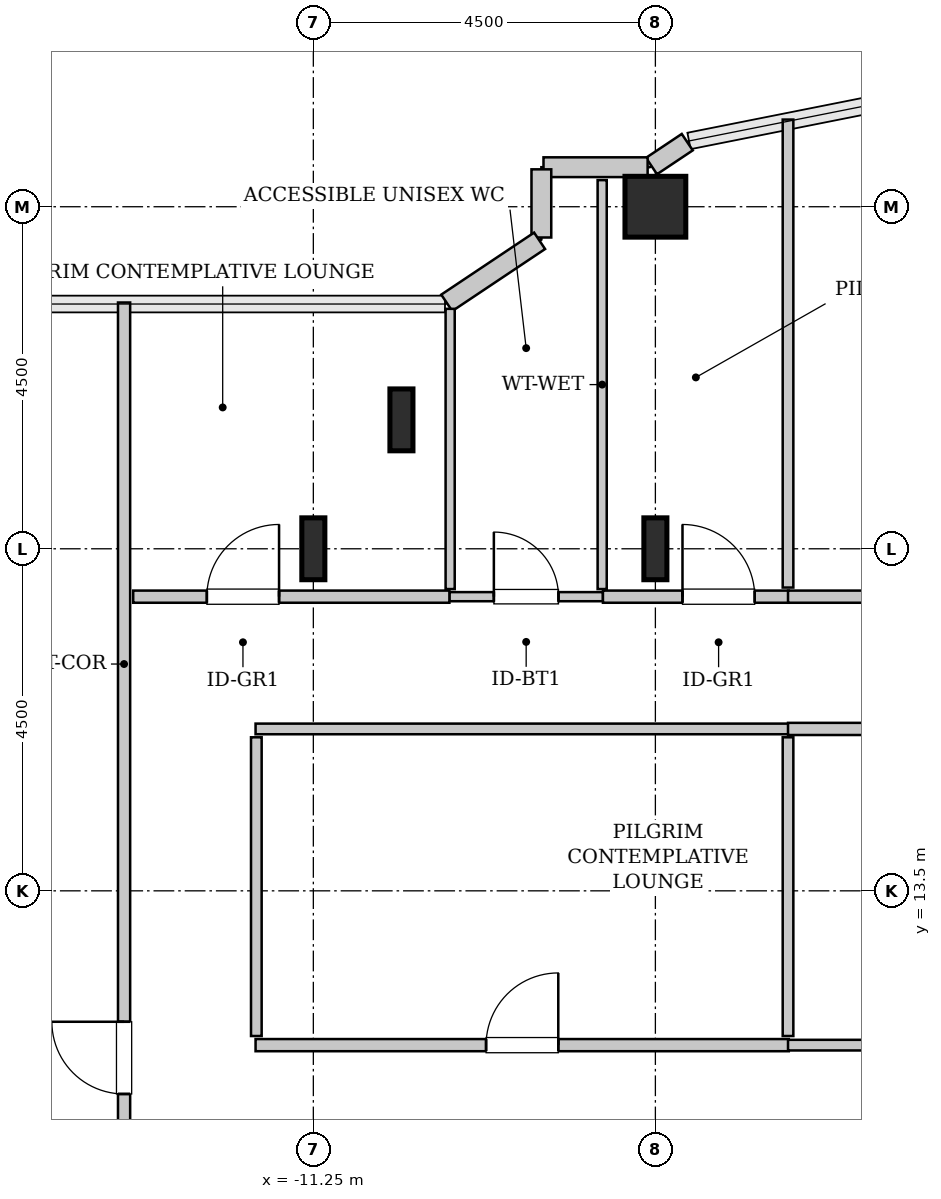
"""IFC4 building model, lengths in metres.
Left out: names, types, materials, properties, quantities, classifications, styles, units other than length and angle.
Written with IfcOpenShell. Run it as: python <this file> out.ifc"""

import sys

from ifc_helpers import new_model, si_unit, direction, frame, frame_2d, origin, origin_2d, place, context, subcontext, project, spatial, rectangle, hollow_rectangle, i_section, extrude, source, transform, mapped, element, fill, save


model = new_model("IFC4")
c1 = context("Model", 3, precision=1e-05, world=origin(), true_north=direction((0.0, 1.0)))
c2 = subcontext(c1, "Body", "Model", "MODEL_VIEW")
j1 = project(units=[si_unit("LENGTHUNIT", "METRE"), si_unit("PLANEANGLEUNIT", "RADIAN")], contexts=[c1])
p1 = place(None, origin())
s1 = spatial("IfcSite", under=j1, at=p1, CompositionType="ELEMENT")
p2 = place(p1, origin())
s2 = spatial("IfcBuilding", under=s1, at=p2, CompositionType="ELEMENT")
p3 = place(p2, frame((0.0, 0.0, 152.6)))
s3 = spatial("IfcBuildingStorey", under=s2, at=p3, CompositionType="ELEMENT", Elevation=152.6)
m1 = source(origin(), c2, "Body", "SweptSolid", [
    extrude(i_section(OverallWidth=0.303, OverallDepth=0.814, WebThickness=0.021, FlangeThickness=0.04, FilletRadius=0.03, at=origin_2d()), origin(), (0.0, 0.0, 1.0), 3.8),
])
for number, where, z_axis, x_axis in (
    (1, (-11.25, 18.0, 0.0), (0.0, 0.0, 1.0), (1.0, 0.0, 0.0)),
    (2, (-10.091, 19.696, 0.0), (0.0, 0.0, 1.0), (1.0, 0.0, 0.0)),
    (3, (-6.75, 18.0, 0.0), (0.0, 0.0, 1.0), (1.0, 0.0, 0.0)),
):
    element("IfcColumn", number, at=place(p3, frame(where, z_axis=z_axis, x_axis=x_axis)), inside=s3, PredefinedType="COLUMN", context=c2, shape_type="MappedRepresentation", body=[
        mapped(m1, transform((0.0, 0.0, 0.0), x_axis=(1.0, 0.0, 0.0), y_axis=(0.0, 1.0, 0.0), z_axis=(0.0, 0.0, 1.0), scale=1.0)),
    ])
m2 = source(origin(), c2, "Body", "SweptSolid", [
    extrude(hollow_rectangle(XDim=0.8, YDim=0.8, WallThickness=0.04, InnerFilletRadius=0.04, OuterFilletRadius=0.08, at=origin_2d()), origin(), (0.0, 0.0, 1.0), 3.8),
])
p4 = place(p3, frame((-6.75, 22.5, 0.0), z_axis=(0.0, 0.0, 1.0), x_axis=(1.0, 0.0, 0.0)))
e4 = element("IfcColumn", 4, at=p4, inside=s3, PredefinedType="COLUMN", context=c2, shape_type="MappedRepresentation", body=[
    mapped(m2, transform((0.0, 0.0, 0.0), x_axis=(1.0, 0.0, 0.0), y_axis=(0.0, 1.0, 0.0), z_axis=(0.0, 0.0, 1.0), scale=1.0)),
])
m3 = source(origin(), c2, "Body", "SweptSolid", [
    extrude(rectangle(XDim=0.565, YDim=0.26, at=frame_2d((0.283, 0.0))), origin(), (0.0, 0.0, 1.0), 3.55),
])
p5 = place(p3, frame((-6.331, 23.35, 0.0), z_axis=(0.0, 0.0, 1.0), x_axis=(-0.831651492666, -0.555297933317, 0.0)))
e5 = element("IfcWall", 5, at=p5, inside=s3, PredefinedType="SOLIDWALL", context=c2, shape_type="MappedRepresentation", body=[
    mapped(m3, transform((0.0, 0.0, 0.0), x_axis=(1.0, 0.0, 0.0), y_axis=(0.0, 1.0, 0.0), z_axis=(0.0, 0.0, 1.0), scale=1.0)),
])
m4 = source(origin(), c2, "Body", "SweptSolid", [
    extrude(rectangle(XDim=1.37, YDim=0.26, at=frame_2d((0.685, 0.0))), origin(), (0.0, 0.0, 1.0), 3.55),
])
p6 = place(p3, frame((-6.852, 23.02, 0.0), z_axis=(0.0, 0.0, 1.0), x_axis=(-1.0, 0.0, 0.0)))
e6 = element("IfcWall", 6, at=p6, inside=s3, PredefinedType="SOLIDWALL", context=c2, shape_type="MappedRepresentation", body=[
    mapped(m4, transform((0.0, 0.0, 0.0), x_axis=(1.0, 0.0, 0.0), y_axis=(0.0, 1.0, 0.0), z_axis=(0.0, 0.0, 1.0), scale=1.0)),
])
m5 = source(origin(), c2, "Body", "SweptSolid", [
    extrude(rectangle(XDim=0.897, YDim=0.26, at=frame_2d((0.448, 0.0))), origin(), (0.0, 0.0, 1.0), 3.55),
])
p7 = place(p3, frame((-8.25, 22.992, 0.0), z_axis=(0.0, 0.0, 1.0), x_axis=(0.0, -1.0, 0.0)))
e7 = element("IfcWall", 7, at=p7, inside=s3, PredefinedType="SOLIDWALL", context=c2, shape_type="MappedRepresentation", body=[
    mapped(m5, transform((0.0, 0.0, 0.0), x_axis=(1.0, 0.0, 0.0), y_axis=(0.0, 1.0, 0.0), z_axis=(0.0, 0.0, 1.0), scale=1.0)),
])
m6 = source(origin(), c2, "Body", "SweptSolid", [
    extrude(rectangle(XDim=1.469, YDim=0.26, at=frame_2d((0.734, 0.0))), origin(), (0.0, 0.0, 1.0), 3.55),
])
p8 = place(p3, frame((-8.273, 22.052, 0.0), z_axis=(0.0, 0.0, 1.0), x_axis=(-0.831461760506, -0.555581983884, 0.0)))
e8 = element("IfcWall", 8, at=p8, inside=s3, PredefinedType="SOLIDWALL", context=c2, shape_type="MappedRepresentation", body=[
    mapped(m6, transform((0.0, 0.0, 0.0), x_axis=(1.0, 0.0, 0.0), y_axis=(0.0, 1.0, 0.0), z_axis=(0.0, 0.0, 1.0), scale=1.0)),
])
m7 = source(origin(), c2, "Body", "SweptSolid", [
    extrude(rectangle(XDim=2.02, YDim=0.12, at=frame_2d((1.01, 0.0))), origin(), (0.0, 0.0, 1.0), 3.535),
])
p9 = place(p3, frame((-9.46, 17.37, 0.0), z_axis=(0.0, 0.0, 1.0), x_axis=(1.0, 0.0, 0.0)))
e9 = element("IfcWall", 9, at=p9, inside=s3, PredefinedType="PLUMBINGWALL", context=c2, shape_type="MappedRepresentation", body=[
    mapped(m7, transform((0.0, 0.0, 0.0), x_axis=(1.0, 0.0, 0.0), y_axis=(0.0, 1.0, 0.0), z_axis=(0.0, 0.0, 1.0), scale=1.0)),
])
p10 = place(p9, frame((0.585, 0.0, 0.0)))
e10 = element("IfcOpeningElement", 10, at=p10, cuts=e9, PredefinedType="OPENING", context=c2, shape_type="SweptSolid", body=[
    extrude(rectangle(XDim=0.85, YDim=2.1, at=frame_2d((0.425, 1.05))), frame((0.0, 0.07, 0.0), z_axis=(0.0, -1.0, 0.0), x_axis=(1.0, 0.0, 0.0)), (0.0, 0.0, 1.0), 0.14),
])
m8 = source(origin(), c2, "Body", "SweptSolid", [
    extrude(rectangle(XDim=5.38, YDim=0.12, at=frame_2d((2.69, 0.0))), origin(), (0.0, 0.0, 1.0), 3.535),
])
p11 = place(p3, frame((-7.45, 17.47, 0.0), z_axis=(0.0, 0.0, 1.0), x_axis=(0.0, 1.0, 0.0)))
e11 = element("IfcWall", 11, at=p11, inside=s3, PredefinedType="PLUMBINGWALL", context=c2, shape_type="MappedRepresentation", body=[
    mapped(m8, transform((0.0, 0.0, 0.0), x_axis=(1.0, 0.0, 0.0), y_axis=(0.0, 1.0, 0.0), z_axis=(0.0, 0.0, 1.0), scale=1.0)),
])
m9 = source(origin(), c2, "Body", "SweptSolid", [
    extrude(rectangle(XDim=3.687, YDim=0.12, at=frame_2d((1.843, 0.0))), origin(), (0.0, 0.0, 1.0), 3.535),
])
p12 = place(p3, frame((-9.45, 17.47, 0.0), z_axis=(0.0, 0.0, 1.0), x_axis=(0.0, 1.0, 0.0)))
e12 = element("IfcWall", 12, at=p12, inside=s3, PredefinedType="PLUMBINGWALL", context=c2, shape_type="MappedRepresentation", body=[
    mapped(m9, transform((0.0, 0.0, 0.0), x_axis=(1.0, 0.0, 0.0), y_axis=(0.0, 1.0, 0.0), z_axis=(0.0, 0.0, 1.0), scale=1.0)),
])
m10 = source(origin(), c2, "Body", "SweptSolid", [
    extrude(rectangle(XDim=16.045, YDim=0.16, at=frame_2d((8.022, 0.0))), origin(), (0.0, 0.0, 1.0), 3.535),
])
p13 = place(p3, frame((-13.74, 5.195, 0.0), z_axis=(0.0, 0.0, 1.0), x_axis=(0.0, 1.0, 0.0)))
e13 = element("IfcWall", 13, at=p13, inside=s3, PredefinedType="PARTITIONING", context=c2, shape_type="MappedRepresentation", body=[
    mapped(m10, transform((0.0, 0.0, 0.0), x_axis=(1.0, 0.0, 0.0), y_axis=(0.0, 1.0, 0.0), z_axis=(0.0, 0.0, 1.0), scale=1.0)),
])
p14 = place(p13, frame((5.633, 0.0, 0.0)))
e14 = element("IfcOpeningElement", 14, at=p14, cuts=e13, PredefinedType="OPENING", context=c2, shape_type="SweptSolid", body=[
    extrude(rectangle(XDim=0.95, YDim=2.1, at=frame_2d((0.475, 1.05))), frame((0.0, 0.09, 0.0), z_axis=(0.0, -1.0, 0.0), x_axis=(1.0, 0.0, 0.0)), (0.0, 0.0, 1.0), 0.18),
])
m11 = source(origin(), c2, "Body", "SweptSolid", [
    extrude(rectangle(XDim=7.015, YDim=0.16, at=frame_2d((3.507, 0.0))), origin(), (0.0, 0.0, 1.0), 3.535),
])
p15 = place(p3, frame((-12.01, 11.47, 0.0), z_axis=(0.0, 0.0, 1.0), x_axis=(1.0, 0.0, 0.0)))
e15 = element("IfcWall", 15, at=p15, inside=s3, PredefinedType="PARTITIONING", context=c2, shape_type="MappedRepresentation", body=[
    mapped(m11, transform((0.0, 0.0, 0.0), x_axis=(1.0, 0.0, 0.0), y_axis=(0.0, 1.0, 0.0), z_axis=(0.0, 0.0, 1.0), scale=1.0)),
])
p16 = place(p15, frame((3.032, 0.0, 0.0)))
e16 = element("IfcOpeningElement", 16, at=p16, cuts=e15, PredefinedType="OPENING", context=c2, shape_type="SweptSolid", body=[
    extrude(rectangle(XDim=0.95, YDim=2.1, at=frame_2d((0.475, 1.05))), frame((0.0, 0.09, 0.0), z_axis=(0.0, -1.0, 0.0), x_axis=(1.0, 0.0, 0.0)), (0.0, 0.0, 1.0), 0.18),
])
m12 = source(origin(), c2, "Body", "SweptSolid", [
    extrude(rectangle(XDim=7.015, YDim=0.14, at=frame_2d((3.507, 0.0))), origin(), (0.0, 0.0, 1.0), 3.535),
])
p17 = place(p3, frame((-12.01, 15.63, 0.0), z_axis=(0.0, 0.0, 1.0), x_axis=(1.0, 0.0, 0.0)))
e17 = element("IfcWall", 17, at=p17, inside=s3, PredefinedType="PARTITIONING", context=c2, shape_type="MappedRepresentation", body=[
    mapped(m12, transform((0.0, 0.0, 0.0), x_axis=(1.0, 0.0, 0.0), y_axis=(0.0, 1.0, 0.0), z_axis=(0.0, 0.0, 1.0), scale=1.0)),
])
m13 = source(origin(), c2, "Body", "SweptSolid", [
    extrude(rectangle(XDim=3.93, YDim=0.14, at=frame_2d((1.965, 0.0))), origin(), (0.0, 0.0, 1.0), 3.535),
])
for number, where, z_axis, x_axis in (
    (18, (-12.0, 11.59, 0.0), (0.0, 0.0, 1.0), (0.0, 1.0, 0.0)),
    (19, (-5.005, 11.59, 0.0), (0.0, 0.0, 1.0), (0.0, 1.0, 0.0)),
):
    element("IfcWall", number, at=place(p3, frame(where, z_axis=z_axis, x_axis=x_axis)), inside=s3, PredefinedType="PARTITIONING", context=c2, shape_type="MappedRepresentation", body=[
        mapped(m13, transform((0.0, 0.0, 0.0), x_axis=(1.0, 0.0, 0.0), y_axis=(0.0, 1.0, 0.0), z_axis=(0.0, 0.0, 1.0), scale=1.0)),
    ])
m14 = source(origin(), c2, "Body", "SweptSolid", [
    extrude(rectangle(XDim=2.445, YDim=0.16, at=frame_2d((1.222, 0.0))), origin(), (0.0, 0.0, 1.0), 3.535),
])
p18 = place(p3, frame((-7.44, 17.37, 0.0), z_axis=(0.0, 0.0, 1.0), x_axis=(1.0, 0.0, 0.0)))
e20 = element("IfcWall", 20, at=p18, inside=s3, PredefinedType="PARTITIONING", context=c2, shape_type="MappedRepresentation", body=[
    mapped(m14, transform((0.0, 0.0, 0.0), x_axis=(1.0, 0.0, 0.0), y_axis=(0.0, 1.0, 0.0), z_axis=(0.0, 0.0, 1.0), scale=1.0)),
])
p19 = place(p18, frame((1.047, 0.0, 0.0)))
e21 = element("IfcOpeningElement", 21, at=p19, cuts=e20, PredefinedType="OPENING", context=c2, shape_type="SweptSolid", body=[
    extrude(rectangle(XDim=0.95, YDim=2.1, at=frame_2d((0.475, 1.05))), frame((0.0, 0.09, 0.0), z_axis=(0.0, -1.0, 0.0), x_axis=(1.0, 0.0, 0.0)), (0.0, 0.0, 1.0), 0.18),
])
m15 = source(origin(), c2, "Body", "SweptSolid", [
    extrude(rectangle(XDim=6.157, YDim=0.14, at=frame_2d((3.078, 0.0))), origin(), (0.0, 0.0, 1.0), 3.535),
])
p20 = place(p3, frame((-5.005, 17.49, 0.0), z_axis=(0.0, 0.0, 1.0), x_axis=(0.0, 1.0, 0.0)))
e22 = element("IfcWall", 22, at=p20, inside=s3, PredefinedType="PARTITIONING", context=c2, shape_type="MappedRepresentation", body=[
    mapped(m15, transform((0.0, 0.0, 0.0), x_axis=(1.0, 0.0, 0.0), y_axis=(0.0, 1.0, 0.0), z_axis=(0.0, 0.0, 1.0), scale=1.0)),
])
m16 = source(origin(), c2, "Body", "SweptSolid", [
    extrude(rectangle(XDim=4.16, YDim=0.16, at=frame_2d((2.08, 0.0))), origin(), (0.0, 0.0, 1.0), 3.535),
])
p21 = place(p3, frame((-13.62, 17.37, 0.0), z_axis=(0.0, 0.0, 1.0), x_axis=(1.0, 0.0, 0.0)))
e23 = element("IfcWall", 23, at=p21, inside=s3, PredefinedType="PARTITIONING", context=c2, shape_type="MappedRepresentation", body=[
    mapped(m16, transform((0.0, 0.0, 0.0), x_axis=(1.0, 0.0, 0.0), y_axis=(0.0, 1.0, 0.0), z_axis=(0.0, 0.0, 1.0), scale=1.0)),
])
p22 = place(p21, frame((0.969, 0.0, 0.0)))
e24 = element("IfcOpeningElement", 24, at=p22, cuts=e23, PredefinedType="OPENING", context=c2, shape_type="SweptSolid", body=[
    extrude(rectangle(XDim=0.95, YDim=2.1, at=frame_2d((0.475, 1.05))), frame((0.0, 0.09, 0.0), z_axis=(0.0, -1.0, 0.0), x_axis=(1.0, 0.0, 0.0)), (0.0, 0.0, 1.0), 0.18),
])
m17 = source(origin(), c2, "Body", "SweptSolid", [
    extrude(rectangle(XDim=7.41, YDim=0.16, at=frame_2d((3.705, 0.0))), origin(), (0.0, 0.0, 1.0), 3.535),
])
p23 = place(p3, frame((-5.005, 17.37, 0.0), z_axis=(0.0, 0.0, 1.0), x_axis=(1.0, 0.0, 0.0)))
e25 = element("IfcWall", 25, at=p23, inside=s3, PredefinedType="PARTITIONING", context=c2, shape_type="MappedRepresentation", body=[
    mapped(m17, transform((0.0, 0.0, 0.0), x_axis=(1.0, 0.0, 0.0), y_axis=(0.0, 1.0, 0.0), z_axis=(0.0, 0.0, 1.0), scale=1.0)),
])
p24 = place(p23, frame((3.23, 0.0, 0.0)))
e26 = element("IfcOpeningElement", 26, at=p24, cuts=e25, PredefinedType="OPENING", context=c2, shape_type="SweptSolid", body=[
    extrude(rectangle(XDim=0.95, YDim=2.1, at=frame_2d((0.475, 1.05))), frame((0.0, 0.09, 0.0), z_axis=(0.0, -1.0, 0.0), x_axis=(1.0, 0.0, 0.0)), (0.0, 0.0, 1.0), 0.18),
])
p25 = place(p3, frame((-5.005, 15.63, 0.0), z_axis=(0.0, 0.0, 1.0), x_axis=(1.0, 0.0, 0.0)))
e27 = element("IfcWall", 27, at=p25, inside=s3, PredefinedType="PARTITIONING", context=c2, shape_type="MappedRepresentation", body=[
    mapped(m17, transform((0.0, 0.0, 0.0), x_axis=(1.0, 0.0, 0.0), y_axis=(0.0, 1.0, 0.0), z_axis=(0.0, 0.0, 1.0), scale=1.0)),
])
p26 = place(p25, frame((3.23, 0.0, 0.0)))
e28 = element("IfcOpeningElement", 28, at=p26, cuts=e27, PredefinedType="OPENING", context=c2, shape_type="SweptSolid", body=[
    extrude(rectangle(XDim=0.95, YDim=2.1, at=frame_2d((0.475, 1.05))), frame((0.0, 0.09, 0.0), z_axis=(0.0, -1.0, 0.0), x_axis=(1.0, 0.0, 0.0)), (0.0, 0.0, 1.0), 0.18),
])
m18 = source(origin(), c2, "Body", "SweptSolid", [
    extrude(rectangle(XDim=7.41, YDim=0.14, at=frame_2d((3.705, 0.0))), origin(), (0.0, 0.0, 1.0), 3.535),
])
p27 = place(p3, frame((-5.005, 11.47, 0.0), z_axis=(0.0, 0.0, 1.0), x_axis=(1.0, 0.0, 0.0)))
e29 = element("IfcWall", 29, at=p27, inside=s3, PredefinedType="PARTITIONING", context=c2, shape_type="MappedRepresentation", body=[
    mapped(m18, transform((0.0, 0.0, 0.0), x_axis=(1.0, 0.0, 0.0), y_axis=(0.0, 1.0, 0.0), z_axis=(0.0, 0.0, 1.0), scale=1.0)),
])
m19 = source(origin(), c2, "Body", "SweptSolid", [
    extrude(rectangle(XDim=0.85, YDim=2.1, at=frame_2d((0.425, 1.05))), frame((0.0, 0.025, 0.0), z_axis=(0.0, -1.0, 0.0), x_axis=(1.0, 0.0, 0.0)), (0.0, 0.0, 1.0), 0.05),
])
p28 = place(p10, origin())
e30 = element("IfcDoor", 30, at=p28, inside=s3, OperationType="SINGLE_SWING_LEFT", PredefinedType="DOOR", context=c2, shape_type="MappedRepresentation", body=[
    mapped(m19, transform((0.0, 0.0, 0.0), x_axis=(1.0, 0.0, 0.0), y_axis=(0.0, 1.0, 0.0), z_axis=(0.0, 0.0, 1.0), scale=1.0)),
])
fill(e10, e30)
m20 = source(origin(), c2, "Body", "SweptSolid", [
    extrude(rectangle(XDim=0.95, YDim=2.1, at=frame_2d((0.475, 1.05))), frame((0.0, 0.025, 0.0), z_axis=(0.0, -1.0, 0.0), x_axis=(1.0, 0.0, 0.0)), (0.0, 0.0, 1.0), 0.05),
])
p29 = place(p14, origin())
e31 = element("IfcDoor", 31, at=p29, inside=s3, OperationType="SINGLE_SWING_RIGHT", PredefinedType="DOOR", context=c2, shape_type="MappedRepresentation", body=[
    mapped(m20, transform((0.0, 0.0, 0.0), x_axis=(1.0, 0.0, 0.0), y_axis=(0.0, 1.0, 0.0), z_axis=(0.0, 0.0, 1.0), scale=1.0)),
])
fill(e14, e31)
p30 = place(p16, origin())
e32 = element("IfcDoor", 32, at=p30, inside=s3, OperationType="SINGLE_SWING_RIGHT", PredefinedType="DOOR", context=c2, shape_type="MappedRepresentation", body=[
    mapped(m20, transform((0.0, 0.0, 0.0), x_axis=(1.0, 0.0, 0.0), y_axis=(0.0, 1.0, 0.0), z_axis=(0.0, 0.0, 1.0), scale=1.0)),
])
fill(e16, e32)
p31 = place(p19, origin())
e33 = element("IfcDoor", 33, at=p31, inside=s3, OperationType="SINGLE_SWING_LEFT", PredefinedType="DOOR", context=c2, shape_type="MappedRepresentation", body=[
    mapped(m20, transform((0.0, 0.0, 0.0), x_axis=(1.0, 0.0, 0.0), y_axis=(0.0, 1.0, 0.0), z_axis=(0.0, 0.0, 1.0), scale=1.0)),
])
fill(e21, e33)
p32 = place(p22, origin())
e34 = element("IfcDoor", 34, at=p32, inside=s3, OperationType="SINGLE_SWING_RIGHT", PredefinedType="DOOR", context=c2, shape_type="MappedRepresentation", body=[
    mapped(m20, transform((0.0, 0.0, 0.0), x_axis=(1.0, 0.0, 0.0), y_axis=(0.0, 1.0, 0.0), z_axis=(0.0, 0.0, 1.0), scale=1.0)),
])
fill(e24, e34)
save(model, sys.argv[1])
